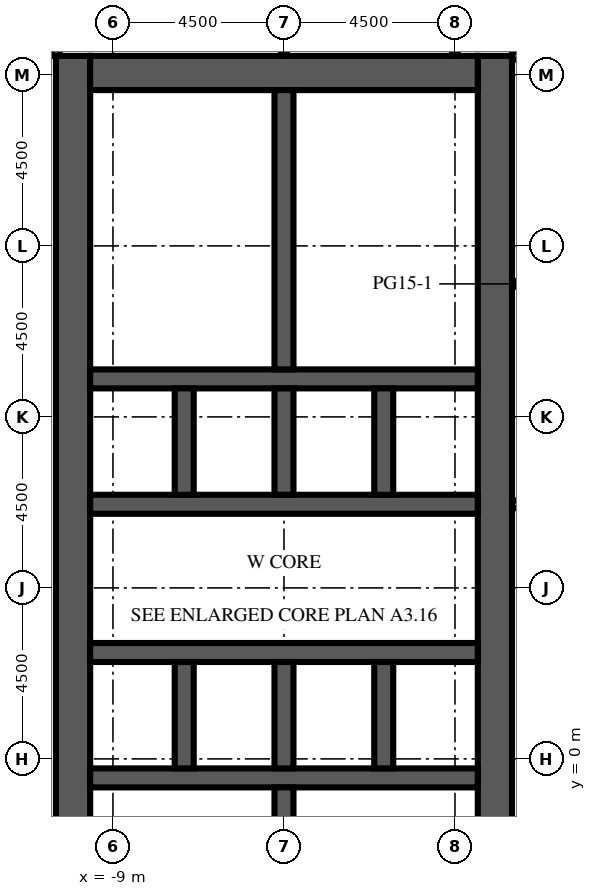
"""IFC4 building model, lengths in metres.
Left out: names, types, materials, properties, quantities, classifications, styles, units other than length and angle.
Written with IfcOpenShell. Run it as: python <this file> out.ifc"""

import sys

from ifc_helpers import new_model, si_unit, direction, frame, frame_2d, origin, place, context, subcontext, project, spatial, rectangle, extrude, element, fill, save


model = new_model("IFC4")
c1 = context("Model", 3, precision=1e-05, world=origin(), true_north=direction((0.0, 1.0)))
c2 = subcontext(c1, "Body", "Model", "MODEL_VIEW")
j1 = project(units=[si_unit("LENGTHUNIT", "METRE"), si_unit("PLANEANGLEUNIT", "RADIAN")], contexts=[c1])
p1 = place(None, origin())
s1 = spatial("IfcSite", under=j1, at=p1, CompositionType="ELEMENT")
p2 = place(p1, origin())
s2 = spatial("IfcBuilding", under=s1, at=p2, CompositionType="ELEMENT")
p3 = place(p2, frame((0.0, 0.0, 102.5)))
s3 = spatial("IfcBuildingStorey", under=s2, at=p3, CompositionType="ELEMENT", Elevation=102.5)
p4 = place(p3, frame((-10.05, -9.0, 0.0), z_axis=(0.0, 0.0, 1.0), x_axis=(0.0, 1.0, 0.0)))
e1 = element("IfcWall", 1, at=p4, inside=s3, PredefinedType="SHEAR", context=c2, shape_type="SweptSolid", body=[
    extrude(rectangle(XDim=27.5, YDim=0.9, at=frame_2d((13.75, 0.0))), origin(), (0.0, 0.0, 1.0), 4.1),
])
p5 = place(p4, frame((12.55, 0.0, 0.0)))
e2 = element("IfcOpeningElement", 2, at=p5, cuts=e1, PredefinedType="OPENING", context=c2, shape_type="SweptSolid", body=[
    extrude(rectangle(XDim=2.4, YDim=2.4, at=frame_2d((1.2, 1.2))), frame((0.0, 0.46, 0.0), z_axis=(0.0, -1.0, 0.0), x_axis=(1.0, 0.0, 0.0)), (0.0, 0.0, 1.0), 0.92),
])
p6 = place(p4, frame((6.825, 0.0, 0.0)))
e3 = element("IfcOpeningElement", 3, at=p6, cuts=e1, PredefinedType="OPENING", context=c2, shape_type="SweptSolid", body=[
    extrude(rectangle(XDim=1.2, YDim=2.1, at=frame_2d((0.6, 1.05))), frame((0.0, 0.46, 0.0), z_axis=(0.0, -1.0, 0.0), x_axis=(1.0, 0.0, 0.0)), (0.0, 0.0, 1.0), 0.92),
])
p7 = place(p4, frame((19.475, 0.0, 0.0)))
e4 = element("IfcOpeningElement", 4, at=p7, cuts=e1, PredefinedType="OPENING", context=c2, shape_type="SweptSolid", body=[
    extrude(rectangle(XDim=1.2, YDim=2.1, at=frame_2d((0.6, 1.05))), frame((0.0, 0.46, 0.0), z_axis=(0.0, -1.0, 0.0), x_axis=(1.0, 0.0, 0.0)), (0.0, 0.0, 1.0), 0.92),
])
p8 = place(p3, frame((1.05, -9.0, 0.0), z_axis=(0.0, 0.0, 1.0), x_axis=(0.0, 1.0, 0.0)))
e5 = element("IfcWall", 5, at=p8, inside=s3, PredefinedType="SHEAR", context=c2, shape_type="SweptSolid", body=[
    extrude(rectangle(XDim=27.5, YDim=0.9, at=frame_2d((13.75, 0.0))), origin(), (0.0, 0.0, 1.0), 4.1),
])
p9 = place(p8, frame((12.55, 0.0, 0.0)))
e6 = element("IfcOpeningElement", 6, at=p9, cuts=e5, PredefinedType="OPENING", context=c2, shape_type="SweptSolid", body=[
    extrude(rectangle(XDim=2.4, YDim=2.4, at=frame_2d((1.2, 1.2))), frame((0.0, 0.46, 0.0), z_axis=(0.0, -1.0, 0.0), x_axis=(1.0, 0.0, 0.0)), (0.0, 0.0, 1.0), 0.92),
])
p10 = place(p8, frame((3.893, 0.0, 0.0)))
e7 = element("IfcOpeningElement", 7, at=p10, cuts=e5, PredefinedType="OPENING", context=c2, shape_type="SweptSolid", body=[
    extrude(rectangle(XDim=0.923, YDim=2.1, at=frame_2d((0.461, 1.05))), frame((0.0, 0.46, 0.0), z_axis=(0.0, -1.0, 0.0), x_axis=(1.0, 0.0, 0.0)), (0.0, 0.0, 1.0), 0.92),
])
p11 = place(p8, frame((23.427, 0.0, 0.0)))
e8 = element("IfcOpeningElement", 8, at=p11, cuts=e5, PredefinedType="OPENING", context=c2, shape_type="SweptSolid", body=[
    extrude(rectangle(XDim=1.2, YDim=2.1, at=frame_2d((0.6, 1.05))), frame((0.0, 0.46, 0.0), z_axis=(0.0, -1.0, 0.0), x_axis=(1.0, 0.0, 0.0)), (0.0, 0.0, 1.0), 0.92),
])
p12 = place(p3, frame((-9.6, 18.05, 0.0), z_axis=(0.0, 0.0, 1.0), x_axis=(1.0, 0.0, 0.0)))
e9 = element("IfcWall", 9, at=p12, inside=s3, PredefinedType="SHEAR", context=c2, shape_type="SweptSolid", body=[
    extrude(rectangle(XDim=10.2, YDim=0.9, at=frame_2d((5.1, 0.0))), origin(), (0.0, 0.0, 1.0), 4.1),
])
p13 = place(p3, frame((-9.6, -0.5, 0.0), z_axis=(0.0, 0.0, 1.0), x_axis=(1.0, 0.0, 0.0)))
e10 = element("IfcWall", 10, at=p13, inside=s3, PredefinedType="SHEAR", context=c2, shape_type="SweptSolid", body=[
    extrude(rectangle(XDim=10.2, YDim=0.5, at=frame_2d((5.1, 0.0))), origin(), (0.0, 0.0, 1.0), 4.1),
])
p14 = place(p3, frame((-9.6, 2.8, 0.0), z_axis=(0.0, 0.0, 1.0), x_axis=(1.0, 0.0, 0.0)))
e11 = element("IfcWall", 11, at=p14, inside=s3, PredefinedType="SHEAR", context=c2, shape_type="SweptSolid", body=[
    extrude(rectangle(XDim=10.2, YDim=0.5, at=frame_2d((5.1, 0.0))), origin(), (0.0, 0.0, 1.0), 4.1),
])
p15 = place(p14, frame((0.562, 0.0, 0.0)))
e12 = element("IfcOpeningElement", 12, at=p15, cuts=e11, PredefinedType="OPENING", context=c2, shape_type="SweptSolid", body=[
    extrude(rectangle(XDim=1.1, YDim=2.1, at=frame_2d((0.55, 1.05))), frame((0.0, 0.26, 0.0), z_axis=(0.0, -1.0, 0.0), x_axis=(1.0, 0.0, 0.0)), (0.0, 0.0, 1.0), 0.52),
])
p16 = place(p14, frame((3.238, 0.0, 0.0)))
e13 = element("IfcOpeningElement", 13, at=p16, cuts=e11, PredefinedType="OPENING", context=c2, shape_type="SweptSolid", body=[
    extrude(rectangle(XDim=1.1, YDim=2.1, at=frame_2d((0.55, 1.05))), frame((0.0, 0.26, 0.0), z_axis=(0.0, -1.0, 0.0), x_axis=(1.0, 0.0, 0.0)), (0.0, 0.0, 1.0), 0.52),
])
p17 = place(p14, frame((8.538, 0.0, 0.0)))
e14 = element("IfcOpeningElement", 14, at=p17, cuts=e11, PredefinedType="OPENING", context=c2, shape_type="SweptSolid", body=[
    extrude(rectangle(XDim=1.1, YDim=2.1, at=frame_2d((0.55, 1.05))), frame((0.0, 0.26, 0.0), z_axis=(0.0, -1.0, 0.0), x_axis=(1.0, 0.0, 0.0)), (0.0, 0.0, 1.0), 0.52),
])
p18 = place(p3, frame((-9.6, 6.7, 0.0), z_axis=(0.0, 0.0, 1.0), x_axis=(1.0, 0.0, 0.0)))
e15 = element("IfcWall", 15, at=p18, inside=s3, PredefinedType="SHEAR", context=c2, shape_type="SweptSolid", body=[
    extrude(rectangle(XDim=10.2, YDim=0.5, at=frame_2d((5.1, 0.0))), origin(), (0.0, 0.0, 1.0), 4.1),
])
p19 = place(p18, frame((0.562, 0.0, 0.0)))
e16 = element("IfcOpeningElement", 16, at=p19, cuts=e15, PredefinedType="OPENING", context=c2, shape_type="SweptSolid", body=[
    extrude(rectangle(XDim=1.1, YDim=2.1, at=frame_2d((0.55, 1.05))), frame((0.0, 0.26, 0.0), z_axis=(0.0, -1.0, 0.0), x_axis=(1.0, 0.0, 0.0)), (0.0, 0.0, 1.0), 0.52),
])
p20 = place(p18, frame((3.288, 0.0, 0.0)))
e17 = element("IfcOpeningElement", 17, at=p20, cuts=e15, PredefinedType="OPENING", context=c2, shape_type="SweptSolid", body=[
    extrude(rectangle(XDim=1.0, YDim=2.1, at=frame_2d((0.5, 1.05))), frame((0.0, 0.26, 0.0), z_axis=(0.0, -1.0, 0.0), x_axis=(1.0, 0.0, 0.0)), (0.0, 0.0, 1.0), 0.52),
])
p21 = place(p18, frame((5.913, 0.0, 0.0)))
e18 = element("IfcOpeningElement", 18, at=p21, cuts=e15, PredefinedType="OPENING", context=c2, shape_type="SweptSolid", body=[
    extrude(rectangle(XDim=1.0, YDim=2.1, at=frame_2d((0.5, 1.05))), frame((0.0, 0.26, 0.0), z_axis=(0.0, -1.0, 0.0), x_axis=(1.0, 0.0, 0.0)), (0.0, 0.0, 1.0), 0.52),
])
p22 = place(p18, frame((8.587, 0.0, 0.0)))
e19 = element("IfcOpeningElement", 19, at=p22, cuts=e15, PredefinedType="OPENING", context=c2, shape_type="SweptSolid", body=[
    extrude(rectangle(XDim=1.0, YDim=2.1, at=frame_2d((0.5, 1.05))), frame((0.0, 0.26, 0.0), z_axis=(0.0, -1.0, 0.0), x_axis=(1.0, 0.0, 0.0)), (0.0, 0.0, 1.0), 0.52),
])
p23 = place(p3, frame((-9.6, 10.0, 0.0), z_axis=(0.0, 0.0, 1.0), x_axis=(1.0, 0.0, 0.0)))
e20 = element("IfcWall", 20, at=p23, inside=s3, PredefinedType="SHEAR", context=c2, shape_type="SweptSolid", body=[
    extrude(rectangle(XDim=10.2, YDim=0.5, at=frame_2d((5.1, 0.0))), origin(), (0.0, 0.0, 1.0), 4.1),
])
for number, where, z_axis, x_axis in (
    (21, (-7.125, -0.25, 0.0), (0.0, 0.0, 1.0), (0.0, 1.0, 0.0)),
    (22, (-7.125, 6.95, 0.0), (0.0, 0.0, 1.0), (0.0, 1.0, 0.0)),
    (23, (-4.5, -0.25, 0.0), (0.0, 0.0, 1.0), (0.0, 1.0, 0.0)),
    (24, (-4.5, 6.95, 0.0), (0.0, 0.0, 1.0), (0.0, 1.0, 0.0)),
    (25, (-1.875, -0.25, 0.0), (0.0, 0.0, 1.0), (0.0, 1.0, 0.0)),
    (26, (-1.875, 6.95, 0.0), (0.0, 0.0, 1.0), (0.0, 1.0, 0.0)),
):
    element("IfcWall", number, at=place(p3, frame(where, z_axis=z_axis, x_axis=x_axis)), inside=s3, PredefinedType="SHEAR", context=c2, shape_type="SweptSolid", body=[
        extrude(rectangle(XDim=2.8, YDim=0.5, at=frame_2d((1.4, 0.0))), origin(), (0.0, 0.0, 1.0), 4.1),
    ])
for number, where, z_axis, x_axis in (
    (27, (-4.5, -8.1, 0.0), (0.0, 0.0, 1.0), (0.0, 1.0, 0.0)),
    (28, (-4.5, 10.25, 0.0), (0.0, 0.0, 1.0), (0.0, 1.0, 0.0)),
):
    element("IfcWall", number, at=place(p3, frame(where, z_axis=z_axis, x_axis=x_axis)), inside=s3, PredefinedType="SHEAR", context=c2, shape_type="SweptSolid", body=[
        extrude(rectangle(XDim=7.35, YDim=0.5, at=frame_2d((3.675, 0.0))), origin(), (0.0, 0.0, 1.0), 4.1),
    ])
p24 = place(p3, frame((-2.407, -3.984, 0.0), z_axis=(0.0, 0.0, 1.0), x_axis=(0.0, 1.0, 0.0)))
e29 = element("IfcWall", 29, at=p24, inside=s3, PredefinedType="PARTITIONING", context=c2, shape_type="SweptSolid", body=[
    extrude(rectangle(XDim=3.234, YDim=0.1, at=frame_2d((1.617, 0.0))), origin(), (0.0, 0.0, 1.0), 3.65),
])
p25 = place(p3, frame((-0.7, 12.455, 0.0), z_axis=(0.0, 0.0, 1.0), x_axis=(1.0, 0.0, 0.0)))
e30 = element("IfcWall", 30, at=p25, inside=s3, PredefinedType="PARTITIONING", context=c2, shape_type="SweptSolid", body=[
    extrude(rectangle(XDim=1.3, YDim=0.1, at=frame_2d((0.65, 0.0))), origin(), (0.0, 0.0, 1.0), 3.65),
])
p26 = place(p25, frame((0.2, 0.0, 0.0)))
e31 = element("IfcOpeningElement", 31, at=p26, cuts=e30, PredefinedType="OPENING", context=c2, shape_type="SweptSolid", body=[
    extrude(rectangle(XDim=0.9, YDim=2.1, at=frame_2d((0.45, 1.05))), frame((0.0, 0.06, 0.0), z_axis=(0.0, -1.0, 0.0), x_axis=(1.0, 0.0, 0.0)), (0.0, 0.0, 1.0), 0.12),
])
p27 = place(p3, frame((-4.25, 12.455, 0.0), z_axis=(0.0, 0.0, 1.0), x_axis=(1.0, 0.0, 0.0)))
e32 = element("IfcWall", 32, at=p27, inside=s3, PredefinedType="PARTITIONING", context=c2, shape_type="SweptSolid", body=[
    extrude(rectangle(XDim=3.55, YDim=0.1, at=frame_2d((1.775, 0.0))), origin(), (0.0, 0.0, 1.0), 3.65),
])
p28 = place(p3, frame((-0.7, 12.455, 0.0), z_axis=(0.0, 0.0, 1.0), x_axis=(0.0, 1.0, 0.0)))
e33 = element("IfcWall", 33, at=p28, inside=s3, PredefinedType="PARTITIONING", context=c2, shape_type="SweptSolid", body=[
    extrude(rectangle(XDim=2.573, YDim=0.1, at=frame_2d((1.286, 0.0))), origin(), (0.0, 0.0, 1.0), 3.65),
])
p29 = place(p28, frame((0.786, 0.0, 0.0)))
e34 = element("IfcOpeningElement", 34, at=p29, cuts=e33, PredefinedType="OPENING", context=c2, shape_type="SweptSolid", body=[
    extrude(rectangle(XDim=1.0, YDim=2.1, at=frame_2d((0.5, 1.05))), frame((0.0, 0.06, 0.0), z_axis=(0.0, -1.0, 0.0), x_axis=(1.0, 0.0, 0.0)), (0.0, 0.0, 1.0), 0.12),
])
p30 = place(p3, frame((-0.7, 15.028, 0.0), z_axis=(0.0, 0.0, 1.0), x_axis=(0.0, 1.0, 0.0)))
e35 = element("IfcWall", 35, at=p30, inside=s3, PredefinedType="PARTITIONING", context=c2, shape_type="SweptSolid", body=[
    extrude(rectangle(XDim=2.573, YDim=0.1, at=frame_2d((1.286, 0.0))), origin(), (0.0, 0.0, 1.0), 3.65),
])
p31 = place(p30, frame((0.786, 0.0, 0.0)))
e36 = element("IfcOpeningElement", 36, at=p31, cuts=e35, PredefinedType="OPENING", context=c2, shape_type="SweptSolid", body=[
    extrude(rectangle(XDim=1.0, YDim=2.1, at=frame_2d((0.5, 1.05))), frame((0.0, 0.06, 0.0), z_axis=(0.0, -1.0, 0.0), x_axis=(1.0, 0.0, 0.0)), (0.0, 0.0, 1.0), 0.12),
])
p32 = place(p3, frame((-4.25, 15.028, 0.0), z_axis=(0.0, 0.0, 1.0), x_axis=(1.0, 0.0, 0.0)))
e37 = element("IfcWall", 37, at=p32, inside=s3, PredefinedType="PARTITIONING", context=c2, shape_type="SweptSolid", body=[
    extrude(rectangle(XDim=3.55, YDim=0.1, at=frame_2d((1.775, 0.0))), origin(), (0.0, 0.0, 1.0), 3.65),
])
p33 = place(p3, frame((-10.5, 31.35, 0.0), z_axis=(0.0, 0.0, 1.0), x_axis=(0.0, -1.0, 0.0)))
e38 = element("IfcWall", 38, at=p33, inside=s3, PredefinedType="PARTITIONING", context=c2, shape_type="SweptSolid", body=[
    extrude(rectangle(XDim=12.85, YDim=0.2, at=frame_2d((6.425, 0.0))), origin(), (0.0, 0.0, 1.0), 3.65),
])
p34 = place(p33, frame((2.5, 0.0, 0.0)))
e39 = element("IfcOpeningElement", 39, at=p34, cuts=e38, PredefinedType="OPENING", context=c2, shape_type="SweptSolid", body=[
    extrude(rectangle(XDim=1.0, YDim=2.1, at=frame_2d((0.5, 1.05))), frame((0.0, 0.11, 0.0), z_axis=(0.0, -1.0, 0.0), x_axis=(1.0, 0.0, 0.0)), (0.0, 0.0, 1.0), 0.22),
])
p35 = place(p3, frame((-4.5, 30.9, 0.0), z_axis=(0.0, 0.0, 1.0), x_axis=(0.0, -1.0, 0.0)))
e40 = element("IfcWall", 40, at=p35, inside=s3, PredefinedType="PARTITIONING", context=c2, shape_type="SweptSolid", body=[
    extrude(rectangle(XDim=12.4, YDim=0.15, at=frame_2d((6.2, 0.0))), origin(), (0.0, 0.0, 1.0), 3.65),
])
p36 = place(p35, frame((3.3, 0.0, 0.0)))
e41 = element("IfcOpeningElement", 41, at=p36, cuts=e40, PredefinedType="OPENING", context=c2, shape_type="SweptSolid", body=[
    extrude(rectangle(XDim=1.0, YDim=2.1, at=frame_2d((0.5, 1.05))), frame((0.0, 0.085, 0.0), z_axis=(0.0, -1.0, 0.0), x_axis=(1.0, 0.0, 0.0)), (0.0, 0.0, 1.0), 0.17),
])
p37 = place(p3, frame((0.0, 18.5, 0.0), z_axis=(0.0, 0.0, 1.0), x_axis=(0.0, 1.0, 0.0)))
e42 = element("IfcWall", 42, at=p37, inside=s3, PredefinedType="PARTITIONING", context=c2, shape_type="SweptSolid", body=[
    extrude(rectangle(XDim=3.3, YDim=0.15, at=frame_2d((1.65, 0.0))), origin(), (0.0, 0.0, 1.0), 3.65),
])
p38 = place(p3, frame((1.5, 6.7, 0.0), z_axis=(0.0, 0.0, 1.0), x_axis=(1.0, 0.0, 0.0)))
e43 = element("IfcWall", 43, at=p38, inside=s3, PredefinedType="PARTITIONING", context=c2, shape_type="SweptSolid", body=[
    extrude(rectangle(XDim=4.5, YDim=0.2, at=frame_2d((2.25, 0.0))), origin(), (0.0, 0.0, 1.0), 3.65),
])
p39 = place(p38, frame((2.35, 0.0, 0.0)))
e44 = element("IfcOpeningElement", 44, at=p39, cuts=e43, PredefinedType="OPENING", context=c2, shape_type="SweptSolid", body=[
    extrude(rectangle(XDim=1.0, YDim=2.1, at=frame_2d((0.5, 1.05))), frame((0.0, 0.11, 0.0), z_axis=(0.0, -1.0, 0.0), x_axis=(1.0, 0.0, 0.0)), (0.0, 0.0, 1.0), 0.22),
])
p40 = place(p3, frame((1.5, 12.5, 0.0), z_axis=(0.0, 0.0, 1.0), x_axis=(1.0, 0.0, 0.0)))
e45 = element("IfcWall", 45, at=p40, inside=s3, PredefinedType="PARTITIONING", context=c2, shape_type="SweptSolid", body=[
    extrude(rectangle(XDim=4.5, YDim=0.15, at=frame_2d((2.25, 0.0))), origin(), (0.0, 0.0, 1.0), 3.65),
])
p41 = place(p40, frame((1.85, 0.0, 0.0)))
e46 = element("IfcOpeningElement", 46, at=p41, cuts=e45, PredefinedType="OPENING", context=c2, shape_type="SweptSolid", body=[
    extrude(rectangle(XDim=1.0, YDim=2.1, at=frame_2d((0.5, 1.05))), frame((0.0, 0.085, 0.0), z_axis=(0.0, -1.0, 0.0), x_axis=(1.0, 0.0, 0.0)), (0.0, 0.0, 1.0), 0.17),
])
p42 = place(p3, frame((1.5, 18.5, 0.0), z_axis=(0.0, 0.0, 1.0), x_axis=(1.0, 0.0, 0.0)))
e47 = element("IfcWall", 47, at=p42, inside=s3, PredefinedType="PARTITIONING", context=c2, shape_type="SweptSolid", body=[
    extrude(rectangle(XDim=4.5, YDim=0.2, at=frame_2d((2.25, 0.0))), origin(), (0.0, 0.0, 1.0), 3.65),
])
p43 = place(p15, origin())
e48 = element("IfcDoor", 48, at=p43, inside=s3, OperationType="DOUBLE_DOOR_SLIDING", PredefinedType="DOOR", context=c2, shape_type="SweptSolid", body=[
    extrude(rectangle(XDim=1.1, YDim=2.1, at=frame_2d((0.55, 1.05))), frame((0.0, 0.025, 0.0), z_axis=(0.0, -1.0, 0.0), x_axis=(1.0, 0.0, 0.0)), (0.0, 0.0, 1.0), 0.05),
])
fill(e12, e48)
p44 = place(p16, origin())
e49 = element("IfcDoor", 49, at=p44, inside=s3, OperationType="DOUBLE_DOOR_SLIDING", PredefinedType="DOOR", context=c2, shape_type="SweptSolid", body=[
    extrude(rectangle(XDim=1.1, YDim=2.1, at=frame_2d((0.55, 1.05))), frame((0.0, 0.025, 0.0), z_axis=(0.0, -1.0, 0.0), x_axis=(1.0, 0.0, 0.0)), (0.0, 0.0, 1.0), 0.05),
])
fill(e13, e49)
p45 = place(p17, origin())
e50 = element("IfcDoor", 50, at=p45, inside=s3, OperationType="DOUBLE_DOOR_SLIDING", PredefinedType="DOOR", context=c2, shape_type="SweptSolid", body=[
    extrude(rectangle(XDim=1.1, YDim=2.1, at=frame_2d((0.55, 1.05))), frame((0.0, 0.025, 0.0), z_axis=(0.0, -1.0, 0.0), x_axis=(1.0, 0.0, 0.0)), (0.0, 0.0, 1.0), 0.05),
])
fill(e14, e50)
p46 = place(p19, origin())
e51 = element("IfcDoor", 51, at=p46, inside=s3, OperationType="DOUBLE_DOOR_SLIDING", PredefinedType="DOOR", context=c2, shape_type="SweptSolid", body=[
    extrude(rectangle(XDim=1.1, YDim=2.1, at=frame_2d((0.55, 1.05))), frame((0.0, 0.025, 0.0), z_axis=(0.0, -1.0, 0.0), x_axis=(1.0, 0.0, 0.0)), (0.0, 0.0, 1.0), 0.05),
])
fill(e16, e51)
p47 = place(p5, origin())
e52 = element("IfcDoor", 52, at=p47, inside=s3, OperationType="DOUBLE_DOOR_DOUBLE_SWING", PredefinedType="DOOR", context=c2, shape_type="SweptSolid", body=[
    extrude(rectangle(XDim=2.4, YDim=2.4, at=frame_2d((1.2, 1.2))), frame((0.0, 0.025, 0.0), z_axis=(0.0, -1.0, 0.0), x_axis=(1.0, 0.0, 0.0)), (0.0, 0.0, 1.0), 0.05),
])
fill(e2, e52)
p48 = place(p9, origin())
e53 = element("IfcDoor", 53, at=p48, inside=s3, OperationType="DOUBLE_DOOR_DOUBLE_SWING", PredefinedType="DOOR", context=c2, shape_type="SweptSolid", body=[
    extrude(rectangle(XDim=2.4, YDim=2.4, at=frame_2d((1.2, 1.2))), frame((0.0, 0.025, 0.0), z_axis=(0.0, -1.0, 0.0), x_axis=(1.0, 0.0, 0.0)), (0.0, 0.0, 1.0), 0.05),
])
fill(e6, e53)
p49 = place(p6, origin())
e54 = element("IfcDoor", 54, at=p49, inside=s3, OperationType="SINGLE_SWING_LEFT", PredefinedType="DOOR", context=c2, shape_type="SweptSolid", body=[
    extrude(rectangle(XDim=1.2, YDim=2.1, at=frame_2d((0.6, 1.05))), frame((0.0, 0.025, 0.0), z_axis=(0.0, -1.0, 0.0), x_axis=(1.0, 0.0, 0.0)), (0.0, 0.0, 1.0), 0.05),
])
fill(e3, e54)
p50 = place(p7, origin())
e55 = element("IfcDoor", 55, at=p50, inside=s3, OperationType="SINGLE_SWING_LEFT", PredefinedType="DOOR", context=c2, shape_type="SweptSolid", body=[
    extrude(rectangle(XDim=1.2, YDim=2.1, at=frame_2d((0.6, 1.05))), frame((0.0, 0.025, 0.0), z_axis=(0.0, -1.0, 0.0), x_axis=(1.0, 0.0, 0.0)), (0.0, 0.0, 1.0), 0.05),
])
fill(e4, e55)
p51 = place(p20, origin())
e56 = element("IfcDoor", 56, at=p51, inside=s3, OperationType="SINGLE_SWING_RIGHT", PredefinedType="DOOR", context=c2, shape_type="SweptSolid", body=[
    extrude(rectangle(XDim=1.0, YDim=2.1, at=frame_2d((0.5, 1.05))), frame((0.0, 0.025, 0.0), z_axis=(0.0, -1.0, 0.0), x_axis=(1.0, 0.0, 0.0)), (0.0, 0.0, 1.0), 0.05),
])
fill(e17, e56)
p52 = place(p21, origin())
e57 = element("IfcDoor", 57, at=p52, inside=s3, OperationType="SINGLE_SWING_LEFT", PredefinedType="DOOR", context=c2, shape_type="SweptSolid", body=[
    extrude(rectangle(XDim=1.0, YDim=2.1, at=frame_2d((0.5, 1.05))), frame((0.0, 0.025, 0.0), z_axis=(0.0, -1.0, 0.0), x_axis=(1.0, 0.0, 0.0)), (0.0, 0.0, 1.0), 0.05),
])
fill(e18, e57)
p53 = place(p22, origin())
e58 = element("IfcDoor", 58, at=p53, inside=s3, OperationType="SINGLE_SWING_RIGHT", PredefinedType="DOOR", context=c2, shape_type="SweptSolid", body=[
    extrude(rectangle(XDim=1.0, YDim=2.1, at=frame_2d((0.5, 1.05))), frame((0.0, 0.025, 0.0), z_axis=(0.0, -1.0, 0.0), x_axis=(1.0, 0.0, 0.0)), (0.0, 0.0, 1.0), 0.05),
])
fill(e19, e58)
p54 = place(p26, origin())
e59 = element("IfcDoor", 59, at=p54, inside=s3, OperationType="SINGLE_SWING_LEFT", PredefinedType="DOOR", context=c2, shape_type="SweptSolid", body=[
    extrude(rectangle(XDim=0.9, YDim=2.1, at=frame_2d((0.45, 1.05))), frame((0.0, 0.025, 0.0), z_axis=(0.0, -1.0, 0.0), x_axis=(1.0, 0.0, 0.0)), (0.0, 0.0, 1.0), 0.05),
])
fill(e31, e59)
p55 = place(p11, origin())
e60 = element("IfcDoor", 60, at=p55, inside=s3, OperationType="SINGLE_SWING_RIGHT", PredefinedType="DOOR", context=c2, shape_type="SweptSolid", body=[
    extrude(rectangle(XDim=1.2, YDim=2.1, at=frame_2d((0.6, 1.05))), frame((0.0, 0.425, 0.0), z_axis=(0.0, -1.0, 0.0), x_axis=(1.0, 0.0, 0.0)), (0.0, 0.0, 1.0), 0.05),
])
fill(e8, e60)
p56 = place(p29, origin())
e61 = element("IfcDoor", 61, at=p56, inside=s3, OperationType="SINGLE_SWING_LEFT", PredefinedType="DOOR", context=c2, shape_type="SweptSolid", body=[
    extrude(rectangle(XDim=1.0, YDim=2.1, at=frame_2d((0.5, 1.05))), frame((0.0, 0.025, 0.0), z_axis=(0.0, -1.0, 0.0), x_axis=(1.0, 0.0, 0.0)), (0.0, 0.0, 1.0), 0.05),
])
fill(e34, e61)
p57 = place(p31, origin())
e62 = element("IfcDoor", 62, at=p57, inside=s3, OperationType="SINGLE_SWING_RIGHT", PredefinedType="DOOR", context=c2, shape_type="SweptSolid", body=[
    extrude(rectangle(XDim=1.0, YDim=2.1, at=frame_2d((0.5, 1.05))), frame((0.0, 0.025, 0.0), z_axis=(0.0, -1.0, 0.0), x_axis=(1.0, 0.0, 0.0)), (0.0, 0.0, 1.0), 0.05),
])
fill(e36, e62)
save(model, sys.argv[1])
